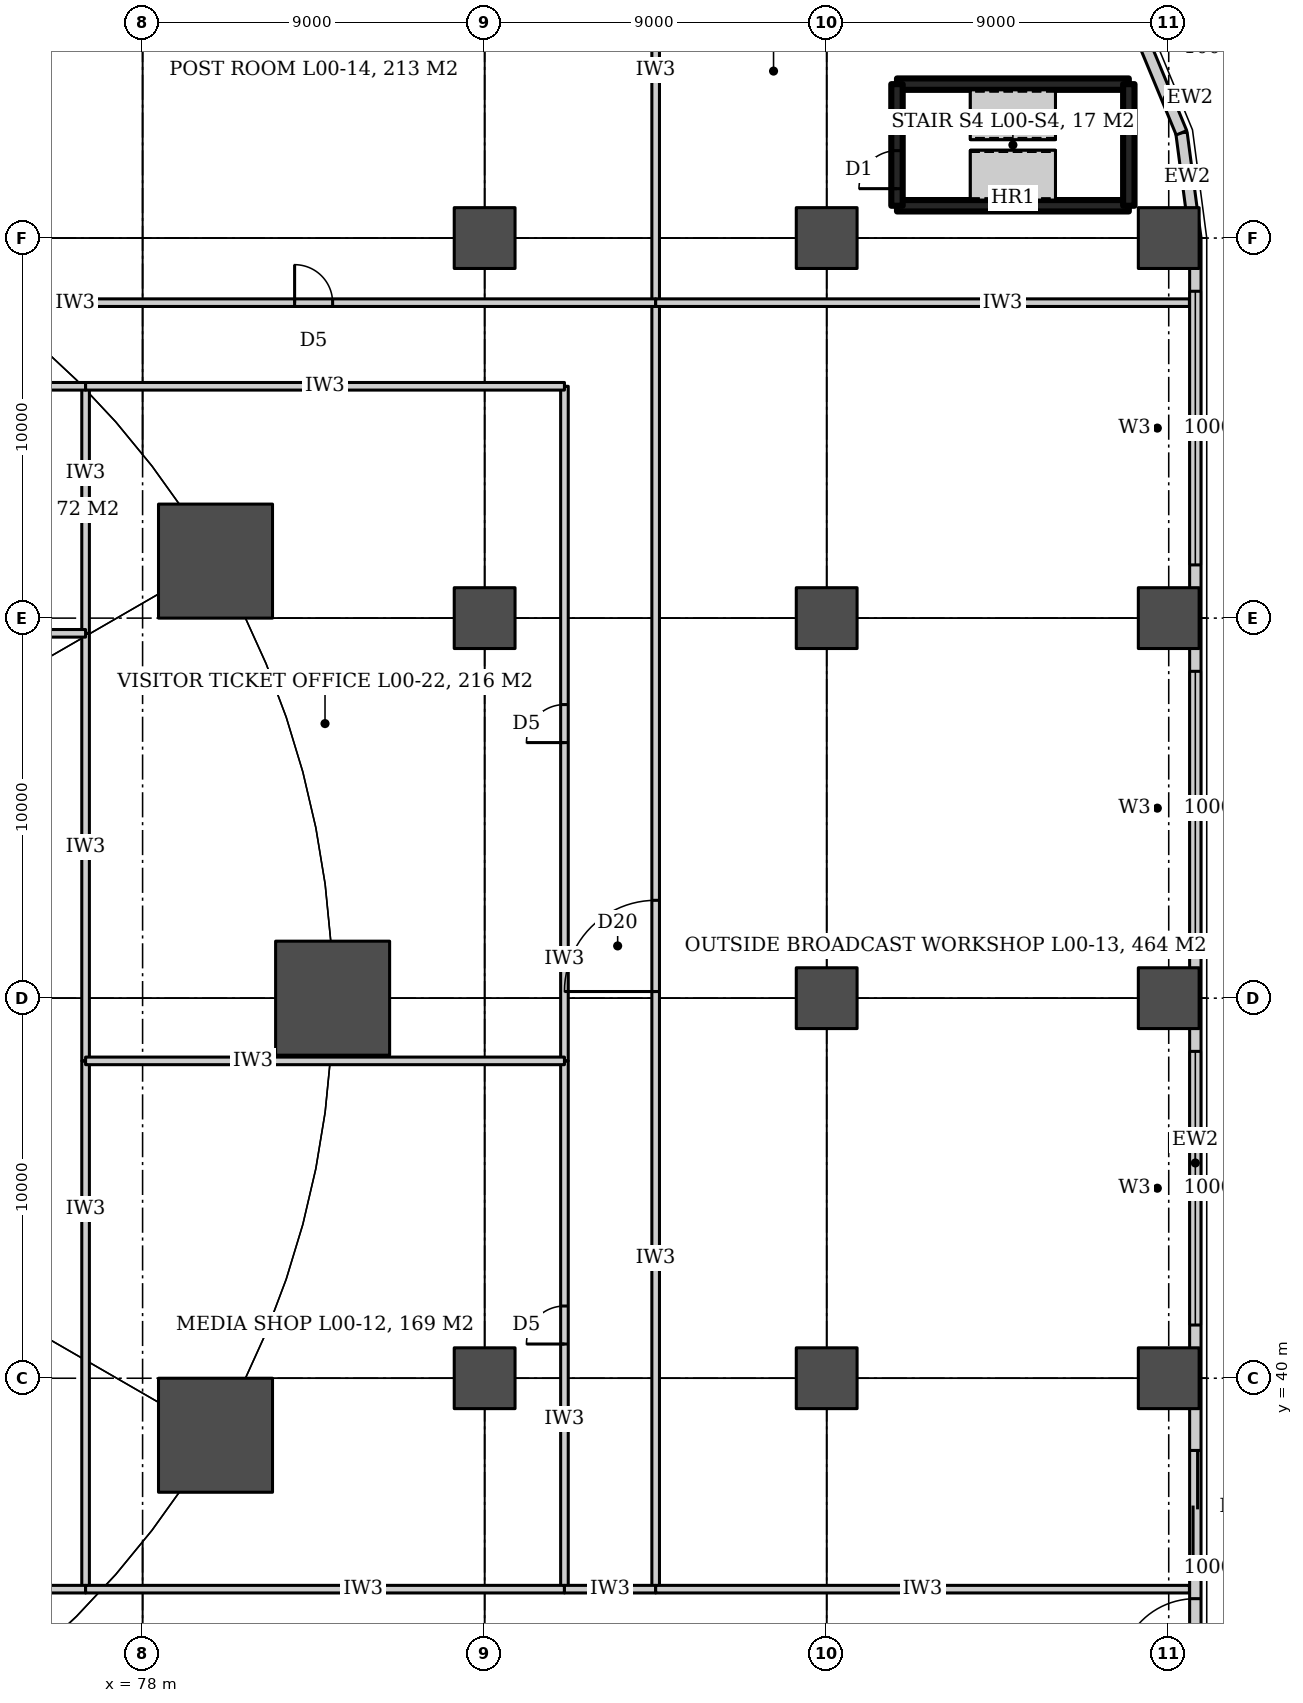
"""IFC4 building model, lengths in metres.
Left out: names, types, materials, properties, quantities, classifications, styles, units other than length and angle.
Written with IfcOpenShell. Run it as: python <this file> out.ifc"""

import sys

from ifc_helpers import new_model, si_unit, direction, frame, frame_2d, origin, origin_2d, place, context, subcontext, project, spatial, rectangle, circle, extrude, element, fill, save


model = new_model("IFC4")
c1 = context("Model", 3, precision=1e-05, world=origin(), true_north=direction((0.0, 1.0)))
c2 = subcontext(c1, "Body", "Model", "MODEL_VIEW")
j1 = project(units=[si_unit("LENGTHUNIT", "METRE"), si_unit("PLANEANGLEUNIT", "RADIAN")], contexts=[c1])
p1 = place(None, origin())
s1 = spatial("IfcSite", under=j1, at=p1, CompositionType="ELEMENT")
p2 = place(p1, origin())
s2 = spatial("IfcBuilding", under=s1, at=p2, CompositionType="ELEMENT")
p3 = place(p2, origin())
s3 = spatial("IfcBuildingStorey", under=s2, at=p3, CompositionType="ELEMENT", Elevation=0.0)
for number, where, z_axis, x_axis in (
    (1, (87.0, 40.0, 0.0), (0.0, 0.0, 1.0), (1.0, 0.0, 0.0)),
    (2, (96.0, 40.0, 0.0), (0.0, 0.0, 1.0), (1.0, 0.0, 0.0)),
    (3, (105.0, 40.0, 0.0), (0.0, 0.0, 1.0), (1.0, 0.0, 0.0)),
    (4, (96.0, 50.0, 0.0), (0.0, 0.0, 1.0), (1.0, 0.0, 0.0)),
    (5, (105.0, 50.0, 0.0), (0.0, 0.0, 1.0), (1.0, 0.0, 0.0)),
    (6, (87.0, 60.0, 0.0), (0.0, 0.0, 1.0), (1.0, 0.0, 0.0)),
    (7, (96.0, 60.0, 0.0), (0.0, 0.0, 1.0), (1.0, 0.0, 0.0)),
    (8, (105.0, 60.0, 0.0), (0.0, 0.0, 1.0), (1.0, 0.0, 0.0)),
    (9, (87.0, 70.0, 0.0), (0.0, 0.0, 1.0), (1.0, 0.0, 0.0)),
    (10, (96.0, 70.0, 0.0), (0.0, 0.0, 1.0), (1.0, 0.0, 0.0)),
    (11, (105.0, 70.0, 0.0), (0.0, 0.0, 1.0), (1.0, 0.0, 0.0)),
):
    element("IfcColumn", number, at=place(p3, frame(where, z_axis=z_axis, x_axis=x_axis)), inside=s3, PredefinedType="COLUMN", context=c2, shape_type="SweptSolid", body=[
        extrude(rectangle(XDim=1.6, YDim=1.6, at=origin_2d()), origin(), (0.0, 0.0, 1.0), 6.0),
    ])
for number, where, z_axis, x_axis in (
    (12, (83.0, 50.0, 0.0), (0.0, 0.0, 1.0), (1.0, 0.0, 0.0)),
    (13, (79.919, 61.5, 0.0), (0.0, 0.0, 1.0), (1.0, 0.0, 0.0)),
    (14, (79.919, 38.5, 0.0), (0.0, 0.0, 1.0), (1.0, 0.0, 0.0)),
):
    element("IfcColumn", number, at=place(p3, frame(where, z_axis=z_axis, x_axis=x_axis)), inside=s3, PredefinedType="COLUMN", context=c2, shape_type="SweptSolid", body=[
        extrude(circle(Radius=1.5, at=origin_2d()), origin(), (0.0, 0.0, 1.0), 6.0),
    ])
p4 = place(p3, frame((76.5, 34.45, 0.0), z_axis=(0.0, 0.0, 1.0), x_axis=(0.0, 1.0, 0.0)))
e15 = element("IfcWall", 15, at=p4, inside=s3, PredefinedType="PARTITIONING", context=c2, shape_type="SweptSolid", body=[
    extrude(rectangle(XDim=13.9, YDim=0.2, at=frame_2d((6.95, 0.0))), origin(), (0.0, 0.0, 1.0), 3.08),
])
p5 = place(p3, frame((76.5, 48.35, 0.0), z_axis=(0.0, 0.0, 1.0), x_axis=(0.0, 1.0, 0.0)))
e16 = element("IfcWall", 16, at=p5, inside=s3, PredefinedType="PARTITIONING", context=c2, shape_type="SweptSolid", body=[
    extrude(rectangle(XDim=11.25, YDim=0.2, at=frame_2d((5.625, 0.0))), origin(), (0.0, 0.0, 1.0), 3.08),
])
p6 = place(p3, frame((76.5, 59.6, 0.0), z_axis=(0.0, 0.0, 1.0), x_axis=(0.0, 1.0, 0.0)))
e17 = element("IfcWall", 17, at=p6, inside=s3, PredefinedType="PARTITIONING", context=c2, shape_type="SweptSolid", body=[
    extrude(rectangle(XDim=6.5, YDim=0.2, at=frame_2d((3.25, 0.0))), origin(), (0.0, 0.0, 1.0), 3.08),
])
p7 = place(p3, frame((89.1, 34.45, 0.0), z_axis=(0.0, 0.0, 1.0), x_axis=(0.0, 1.0, 0.0)))
e18 = element("IfcWall", 18, at=p7, inside=s3, PredefinedType="PARTITIONING", context=c2, shape_type="SweptSolid", body=[
    extrude(rectangle(XDim=13.9, YDim=0.2, at=frame_2d((6.95, 0.0))), origin(), (0.0, 0.0, 1.0), 3.68),
])
p8 = place(p7, frame((6.45, 0.0, 0.0)))
e19 = element("IfcOpeningElement", 19, at=p8, cuts=e18, PredefinedType="OPENING", context=c2, shape_type="SweptSolid", body=[
    extrude(rectangle(XDim=1.0, YDim=2.1, at=frame_2d((0.5, 1.05))), frame((0.0, 0.11, 0.0), z_axis=(0.0, -1.0, 0.0), x_axis=(1.0, 0.0, 0.0)), (0.0, 0.0, 1.0), 0.22),
])
p9 = place(p3, frame((89.1, 48.35, 0.0), z_axis=(0.0, 0.0, 1.0), x_axis=(0.0, 1.0, 0.0)))
e20 = element("IfcWall", 20, at=p9, inside=s3, PredefinedType="PARTITIONING", context=c2, shape_type="SweptSolid", body=[
    extrude(rectangle(XDim=17.75, YDim=0.2, at=frame_2d((8.875, 0.0))), origin(), (0.0, 0.0, 1.0), 3.68),
])
p10 = place(p9, frame((8.375, 0.0, 0.0)))
e21 = element("IfcOpeningElement", 21, at=p10, cuts=e20, PredefinedType="OPENING", context=c2, shape_type="SweptSolid", body=[
    extrude(rectangle(XDim=1.0, YDim=2.1, at=frame_2d((0.5, 1.05))), frame((0.0, 0.11, 0.0), z_axis=(0.0, -1.0, 0.0), x_axis=(1.0, 0.0, 0.0)), (0.0, 0.0, 1.0), 0.22),
])
p11 = place(p3, frame((91.5, 34.45, 0.0), z_axis=(0.0, 0.0, 1.0), x_axis=(0.0, 1.0, 0.0)))
e22 = element("IfcWall", 22, at=p11, inside=s3, PredefinedType="PARTITIONING", context=c2, shape_type="SweptSolid", body=[
    extrude(rectangle(XDim=33.85, YDim=0.2, at=frame_2d((16.925, 0.0))), origin(), (0.0, 0.0, 1.0), 3.68),
])
p12 = place(p11, frame((15.725, 0.0, 0.0)))
e23 = element("IfcOpeningElement", 23, at=p12, cuts=e22, PredefinedType="OPENING", context=c2, shape_type="SweptSolid", body=[
    extrude(rectangle(XDim=2.4, YDim=2.7, at=frame_2d((1.2, 1.35))), frame((0.0, 0.11, 0.0), z_axis=(0.0, -1.0, 0.0), x_axis=(1.0, 0.0, 0.0)), (0.0, 0.0, 1.0), 0.22),
])
p13 = place(p3, frame((91.5, 68.3, 0.0), z_axis=(0.0, 0.0, 1.0), x_axis=(0.0, 1.0, 0.0)))
e24 = element("IfcWall", 24, at=p13, inside=s3, PredefinedType="PARTITIONING", context=c2, shape_type="SweptSolid", body=[
    extrude(rectangle(XDim=12.245, YDim=0.2, at=frame_2d((6.123, 0.0))), origin(), (0.0, 0.0, 1.0), 3.68),
])
p14 = place(p3, frame((43.5, 34.45, 0.0), z_axis=(0.0, 0.0, 1.0), x_axis=(1.0, 0.0, 0.0)))
e25 = element("IfcWall", 25, at=p14, inside=s3, PredefinedType="PARTITIONING", context=c2, shape_type="SweptSolid", body=[
    extrude(rectangle(XDim=33.0, YDim=0.2, at=frame_2d((16.5, 0.0))), origin(), (0.0, 0.0, 1.0), 3.08),
])
p15 = place(p14, frame((18.5, 0.0, 0.0)))
e26 = element("IfcOpeningElement", 26, at=p15, cuts=e25, PredefinedType="OPENING", context=c2, shape_type="SweptSolid", body=[
    extrude(rectangle(XDim=2.0, YDim=2.1, at=frame_2d((1.0, 1.05))), frame((0.0, 0.11, 0.0), z_axis=(0.0, -1.0, 0.0), x_axis=(1.0, 0.0, 0.0)), (0.0, 0.0, 1.0), 0.22),
])
p16 = place(p3, frame((76.5, 34.45, 0.0), z_axis=(0.0, 0.0, 1.0), x_axis=(1.0, 0.0, 0.0)))
e27 = element("IfcWall", 27, at=p16, inside=s3, PredefinedType="PARTITIONING", context=c2, shape_type="SweptSolid", body=[
    extrude(rectangle(XDim=12.6, YDim=0.2, at=frame_2d((6.3, 0.0))), origin(), (0.0, 0.0, 1.0), 3.68),
])
p17 = place(p3, frame((89.1, 34.45, 0.0), z_axis=(0.0, 0.0, 1.0), x_axis=(1.0, 0.0, 0.0)))
e28 = element("IfcWall", 28, at=p17, inside=s3, PredefinedType="PARTITIONING", context=c2, shape_type="SweptSolid", body=[
    extrude(rectangle(XDim=2.4, YDim=0.2, at=frame_2d((1.2, 0.0))), origin(), (0.0, 0.0, 1.0), 3.68),
])
p18 = place(p3, frame((91.5, 34.45, 0.0), z_axis=(0.0, 0.0, 1.0), x_axis=(1.0, 0.0, 0.0)))
e29 = element("IfcWall", 29, at=p18, inside=s3, PredefinedType="PARTITIONING", context=c2, shape_type="SweptSolid", body=[
    extrude(rectangle(XDim=14.045, YDim=0.2, at=frame_2d((7.022, 0.0))), origin(), (0.0, 0.0, 1.0), 3.68),
])
p19 = place(p3, frame((76.5, 48.35, 0.0), z_axis=(0.0, 0.0, 1.0), x_axis=(1.0, 0.0, 0.0)))
e30 = element("IfcWall", 30, at=p19, inside=s3, PredefinedType="PARTITIONING", context=c2, shape_type="SweptSolid", body=[
    extrude(rectangle(XDim=12.6, YDim=0.2, at=frame_2d((6.3, 0.0))), origin(), (0.0, 0.0, 1.0), 3.68),
])
p20 = place(p3, frame((64.7, 59.6, 0.0), z_axis=(0.0, 0.0, 1.0), x_axis=(1.0, 0.0, 0.0)))
e31 = element("IfcWall", 31, at=p20, inside=s3, PredefinedType="PARTITIONING", context=c2, shape_type="SweptSolid", body=[
    extrude(rectangle(XDim=11.8, YDim=0.2, at=frame_2d((5.9, 0.0))), origin(), (0.0, 0.0, 1.0), 2.48),
])
p21 = place(p3, frame((64.7, 66.1, 0.0), z_axis=(0.0, 0.0, 1.0), x_axis=(1.0, 0.0, 0.0)))
e32 = element("IfcWall", 32, at=p21, inside=s3, PredefinedType="PARTITIONING", context=c2, shape_type="SweptSolid", body=[
    extrude(rectangle(XDim=11.8, YDim=0.2, at=frame_2d((5.9, 0.0))), origin(), (0.0, 0.0, 1.0), 3.08),
])
p22 = place(p21, frame((5.4, 0.0, 0.0)))
e33 = element("IfcOpeningElement", 33, at=p22, cuts=e32, PredefinedType="OPENING", context=c2, shape_type="SweptSolid", body=[
    extrude(rectangle(XDim=1.0, YDim=2.1, at=frame_2d((0.5, 1.05))), frame((0.0, 0.11, 0.0), z_axis=(0.0, -1.0, 0.0), x_axis=(1.0, 0.0, 0.0)), (0.0, 0.0, 1.0), 0.22),
])
p23 = place(p3, frame((76.5, 66.1, 0.0), z_axis=(0.0, 0.0, 1.0), x_axis=(1.0, 0.0, 0.0)))
e34 = element("IfcWall", 34, at=p23, inside=s3, PredefinedType="PARTITIONING", context=c2, shape_type="SweptSolid", body=[
    extrude(rectangle(XDim=12.6, YDim=0.2, at=frame_2d((6.3, 0.0))), origin(), (0.0, 0.0, 1.0), 3.68),
])
p24 = place(p3, frame((73.5, 68.3, 0.0), z_axis=(0.0, 0.0, 1.0), x_axis=(1.0, 0.0, 0.0)))
e35 = element("IfcWall", 35, at=p24, inside=s3, PredefinedType="PARTITIONING", context=c2, shape_type="SweptSolid", body=[
    extrude(rectangle(XDim=18.0, YDim=0.2, at=frame_2d((9.0, 0.0))), origin(), (0.0, 0.0, 1.0), 3.68),
])
p25 = place(p24, frame((8.5, 0.0, 0.0)))
e36 = element("IfcOpeningElement", 36, at=p25, cuts=e35, PredefinedType="OPENING", context=c2, shape_type="SweptSolid", body=[
    extrude(rectangle(XDim=1.0, YDim=2.1, at=frame_2d((0.5, 1.05))), frame((0.0, 0.11, 0.0), z_axis=(0.0, -1.0, 0.0), x_axis=(1.0, 0.0, 0.0)), (0.0, 0.0, 1.0), 0.22),
])
p26 = place(p3, frame((91.5, 68.3, 0.0), z_axis=(0.0, 0.0, 1.0), x_axis=(1.0, 0.0, 0.0)))
e37 = element("IfcWall", 37, at=p26, inside=s3, PredefinedType="PARTITIONING", context=c2, shape_type="SweptSolid", body=[
    extrude(rectangle(XDim=14.045, YDim=0.2, at=frame_2d((7.022, 0.0))), origin(), (0.0, 0.0, 1.0), 4.1),
])
p27 = place(p3, frame((105.7, 30.0, 0.0), z_axis=(0.0, 0.0, 1.0), x_axis=(0.0, 1.0, 0.0)))
e38 = element("IfcWall", 38, at=p27, inside=s3, PredefinedType="SOLIDWALL", context=c2, shape_type="SweptSolid", body=[
    extrude(rectangle(XDim=40.0, YDim=0.3, at=frame_2d((20.0, 0.0))), origin(), (0.0, 0.0, 1.0), 5.7),
])
p28 = place(p27, frame((5.1, 0.0, 0.0)))
e39 = element("IfcOpeningElement", 39, at=p28, cuts=e38, PredefinedType="OPENING", context=c2, shape_type="SweptSolid", body=[
    extrude(rectangle(XDim=3.0, YDim=3.0, at=frame_2d((1.5, 1.5))), frame((0.0, 0.16, 0.0), z_axis=(0.0, -1.0, 0.0), x_axis=(1.0, 0.0, 0.0)), (0.0, 0.0, 1.0), 0.32),
])
p29 = place(p27, frame((2.2, 0.0, 0.0)))
e40 = element("IfcOpeningElement", 40, at=p29, cuts=e38, PredefinedType="OPENING", context=c2, shape_type="SweptSolid", body=[
    extrude(rectangle(XDim=2.0, YDim=3.0, at=frame_2d((1.0, 1.5))), frame((0.0, 0.16, 0.0), z_axis=(0.0, -1.0, 0.0), x_axis=(1.0, 0.0, 0.0)), (0.0, 0.0, 1.0), 0.32),
])
p30 = place(p27, frame((11.4, 0.0, 0.6)))
e41 = element("IfcOpeningElement", 41, at=p30, cuts=e38, PredefinedType="OPENING", context=c2, shape_type="SweptSolid", body=[
    extrude(rectangle(XDim=7.2, YDim=3.6, at=frame_2d((3.6, 1.8))), frame((0.0, 0.16, 0.0), z_axis=(0.0, -1.0, 0.0), x_axis=(1.0, 0.0, 0.0)), (0.0, 0.0, 1.0), 0.32),
])
p31 = place(p27, frame((21.4, 0.0, 0.6)))
e42 = element("IfcOpeningElement", 42, at=p31, cuts=e38, PredefinedType="OPENING", context=c2, shape_type="SweptSolid", body=[
    extrude(rectangle(XDim=7.2, YDim=3.6, at=frame_2d((3.6, 1.8))), frame((0.0, 0.16, 0.0), z_axis=(0.0, -1.0, 0.0), x_axis=(1.0, 0.0, 0.0)), (0.0, 0.0, 1.0), 0.32),
])
p32 = place(p27, frame((31.4, 0.0, 0.6)))
e43 = element("IfcOpeningElement", 43, at=p32, cuts=e38, PredefinedType="OPENING", context=c2, shape_type="SweptSolid", body=[
    extrude(rectangle(XDim=7.2, YDim=3.6, at=frame_2d((3.6, 1.8))), frame((0.0, 0.16, 0.0), z_axis=(0.0, -1.0, 0.0), x_axis=(1.0, 0.0, 0.0)), (0.0, 0.0, 1.0), 0.32),
])
p33 = place(p3, frame((105.7, 70.0, 0.0), z_axis=(0.0, 0.0, 1.0), x_axis=(-0.130497471798, 0.991448642066, 0.0)))
e44 = element("IfcWall", 44, at=p33, inside=s3, PredefinedType="SOLIDWALL", context=c2, shape_type="SweptSolid", body=[
    extrude(rectangle(XDim=2.793, YDim=0.3, at=frame_2d((1.396, 0.0))), origin(), (0.0, 0.0, 1.0), 5.7),
])
p34 = place(p3, frame((105.335, 72.769, 0.0), z_axis=(0.0, 0.0, 1.0), x_axis=(-0.382709424419, 0.923868765822, 0.0)))
e45 = element("IfcWall", 45, at=p34, inside=s3, PredefinedType="SOLIDWALL", context=c2, shape_type="SweptSolid", body=[
    extrude(rectangle(XDim=2.793, YDim=0.3, at=frame_2d((1.397, 0.0))), origin(), (0.0, 0.0, 1.0), 5.7),
])
for number, where, z_axis, x_axis in (
    (46, (97.85, 70.85, 0.0), (0.0, 0.0, 1.0), (1.0, 0.0, 0.0)),
    (47, (97.85, 74.05, 0.0), (0.0, 0.0, 1.0), (1.0, 0.0, 0.0)),
):
    element("IfcWall", number, at=place(p3, frame(where, z_axis=z_axis, x_axis=x_axis)), inside=s3, PredefinedType="SHEAR", context=c2, shape_type="SweptSolid", body=[
        extrude(rectangle(XDim=6.1, YDim=0.3, at=frame_2d((3.05, 0.0))), origin(), (0.0, 0.0, 1.0), 6.0),
    ])
p35 = place(p3, frame((97.85, 70.85, 0.0), z_axis=(0.0, 0.0, 1.0), x_axis=(0.0, 1.0, 0.0)))
e48 = element("IfcWall", 48, at=p35, inside=s3, PredefinedType="SHEAR", context=c2, shape_type="SweptSolid", body=[
    extrude(rectangle(XDim=3.2, YDim=0.3, at=frame_2d((1.6, 0.0))), origin(), (0.0, 0.0, 1.0), 6.0),
])
p36 = place(p35, frame((0.45, 0.0, 0.0)))
e49 = element("IfcOpeningElement", 49, at=p36, cuts=e48, PredefinedType="OPENING", context=c2, shape_type="SweptSolid", body=[
    extrude(rectangle(XDim=1.0, YDim=2.1, at=frame_2d((0.5, 1.05))), frame((0.0, 0.16, 0.0), z_axis=(0.0, -1.0, 0.0), x_axis=(1.0, 0.0, 0.0)), (0.0, 0.0, 1.0), 0.32),
])
p37 = place(p3, frame((103.95, 70.85, 0.0), z_axis=(0.0, 0.0, 1.0), x_axis=(0.0, 1.0, 0.0)))
e50 = element("IfcWall", 50, at=p37, inside=s3, PredefinedType="SHEAR", context=c2, shape_type="SweptSolid", body=[
    extrude(rectangle(XDim=3.2, YDim=0.3, at=frame_2d((1.6, 0.0))), origin(), (0.0, 0.0, 1.0), 6.0),
])
p38 = place(p12, origin())
e51 = element("IfcDoor", 51, at=p38, inside=s3, OperationType="DOUBLE_DOOR_DOUBLE_SWING", PredefinedType="DOOR", context=c2, shape_type="SweptSolid", body=[
    extrude(rectangle(XDim=2.4, YDim=2.7, at=frame_2d((1.2, 1.35))), frame((0.0, 0.025, 0.0), z_axis=(0.0, -1.0, 0.0), x_axis=(1.0, 0.0, 0.0)), (0.0, 0.0, 1.0), 0.05),
])
fill(e23, e51)
p39 = place(p25, origin())
e52 = element("IfcDoor", 52, at=p39, inside=s3, OperationType="SINGLE_SWING_LEFT", PredefinedType="DOOR", context=c2, shape_type="SweptSolid", body=[
    extrude(rectangle(XDim=1.0, YDim=2.1, at=frame_2d((0.5, 1.05))), frame((0.0, 0.025, 0.0), z_axis=(0.0, -1.0, 0.0), x_axis=(1.0, 0.0, 0.0)), (0.0, 0.0, 1.0), 0.05),
])
fill(e36, e52)
p40 = place(p8, origin())
e53 = element("IfcDoor", 53, at=p40, inside=s3, OperationType="SINGLE_SWING_LEFT", PredefinedType="DOOR", context=c2, shape_type="SweptSolid", body=[
    extrude(rectangle(XDim=1.0, YDim=2.1, at=frame_2d((0.5, 1.05))), frame((0.0, 0.025, 0.0), z_axis=(0.0, -1.0, 0.0), x_axis=(1.0, 0.0, 0.0)), (0.0, 0.0, 1.0), 0.05),
])
fill(e19, e53)
p41 = place(p10, origin())
e54 = element("IfcDoor", 54, at=p41, inside=s3, OperationType="SINGLE_SWING_LEFT", PredefinedType="DOOR", context=c2, shape_type="SweptSolid", body=[
    extrude(rectangle(XDim=1.0, YDim=2.1, at=frame_2d((0.5, 1.05))), frame((0.0, 0.025, 0.0), z_axis=(0.0, -1.0, 0.0), x_axis=(1.0, 0.0, 0.0)), (0.0, 0.0, 1.0), 0.05),
])
fill(e21, e54)
p42 = place(p28, origin())
e55 = element("IfcDoor", 55, at=p42, inside=s3, OperationType="DOUBLE_DOOR_SLIDING", PredefinedType="DOOR", context=c2, shape_type="SweptSolid", body=[
    extrude(rectangle(XDim=3.0, YDim=3.0, at=frame_2d((1.5, 1.5))), frame((0.0, 0.025, 0.0), z_axis=(0.0, -1.0, 0.0), x_axis=(1.0, 0.0, 0.0)), (0.0, 0.0, 1.0), 0.05),
])
fill(e39, e55)
p43 = place(p29, origin())
e56 = element("IfcDoor", 56, at=p43, inside=s3, OperationType="DOUBLE_DOOR_DOUBLE_SWING", PredefinedType="DOOR", context=c2, shape_type="SweptSolid", body=[
    extrude(rectangle(XDim=2.0, YDim=3.0, at=frame_2d((1.0, 1.5))), frame((0.0, 0.025, 0.0), z_axis=(0.0, -1.0, 0.0), x_axis=(1.0, 0.0, 0.0)), (0.0, 0.0, 1.0), 0.05),
])
fill(e40, e56)
p44 = place(p30, origin())
e57 = element("IfcWindow", 57, at=p44, inside=s3, PartitioningType="SINGLE_PANEL", PredefinedType="WINDOW", context=c2, shape_type="SweptSolid", body=[
    extrude(rectangle(XDim=7.2, YDim=3.6, at=frame_2d((3.6, 1.8))), frame((0.0, 0.03, 0.0), z_axis=(0.0, -1.0, 0.0), x_axis=(1.0, 0.0, 0.0)), (0.0, 0.0, 1.0), 0.06),
])
fill(e41, e57)
p45 = place(p31, origin())
e58 = element("IfcWindow", 58, at=p45, inside=s3, PartitioningType="SINGLE_PANEL", PredefinedType="WINDOW", context=c2, shape_type="SweptSolid", body=[
    extrude(rectangle(XDim=7.2, YDim=3.6, at=frame_2d((3.6, 1.8))), frame((0.0, 0.03, 0.0), z_axis=(0.0, -1.0, 0.0), x_axis=(1.0, 0.0, 0.0)), (0.0, 0.0, 1.0), 0.06),
])
fill(e42, e58)
p46 = place(p32, origin())
e59 = element("IfcWindow", 59, at=p46, inside=s3, PartitioningType="SINGLE_PANEL", PredefinedType="WINDOW", context=c2, shape_type="SweptSolid", body=[
    extrude(rectangle(XDim=7.2, YDim=3.6, at=frame_2d((3.6, 1.8))), frame((0.0, 0.03, 0.0), z_axis=(0.0, -1.0, 0.0), x_axis=(1.0, 0.0, 0.0)), (0.0, 0.0, 1.0), 0.06),
])
fill(e43, e59)
p47 = place(p36, origin())
e60 = element("IfcDoor", 60, at=p47, inside=s3, OperationType="SINGLE_SWING_LEFT", PredefinedType="DOOR", context=c2, shape_type="SweptSolid", body=[
    extrude(rectangle(XDim=1.0, YDim=2.1, at=frame_2d((0.5, 1.05))), frame((0.0, 0.025, 0.0), z_axis=(0.0, -1.0, 0.0), x_axis=(1.0, 0.0, 0.0)), (0.0, 0.0, 1.0), 0.05),
])
fill(e49, e60)
save(model, sys.argv[1])
